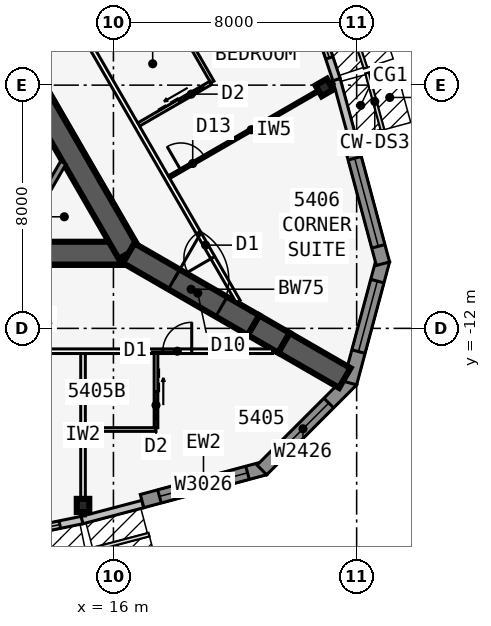
"""IFC4 building model, lengths in metres.
Left out: names, types, materials, properties, quantities, classifications, styles, units other than length and angle.
Written with IfcOpenShell. Run it as: python <this file> out.ifc"""

import sys

from ifc_helpers import new_model, si_unit, direction, frame, frame_2d, origin, origin_2d, place, context, subcontext, project, spatial, polyline, rectangle, i_section, outline, extrude, element, fill, save


model = new_model("IFC4")
c1 = context("Model", 3, precision=1e-05, world=origin(), true_north=direction((0.0, 1.0)))
c2 = subcontext(c1, "Body", "Model", "MODEL_VIEW")
j1 = project(units=[si_unit("LENGTHUNIT", "METRE"), si_unit("PLANEANGLEUNIT", "RADIAN")], contexts=[c1])
p1 = place(None, origin())
s1 = spatial("IfcSite", under=j1, at=p1, CompositionType="ELEMENT")
p2 = place(p1, origin())
s2 = spatial("IfcBuilding", under=s1, at=p2, CompositionType="ELEMENT")
p3 = place(p2, frame((0.0, 0.0, 204.5)))
s3 = spatial("IfcBuildingStorey", under=s2, at=p3, CompositionType="ELEMENT", Elevation=204.5)
p4 = place(p3, frame((-16.5, -9.526, 0.0), z_axis=(0.0, 0.0, 1.0), x_axis=(1.0, 0.0, 0.0)))
e1 = element("IfcWall", 1, at=p4, inside=s3, PredefinedType="SHEAR", context=c2, shape_type="SweptSolid", body=[
    extrude(rectangle(XDim=33.0, YDim=0.75, at=frame_2d((16.5, 0.0))), origin(), (0.0, 0.0, 1.0), 3.6),
])
p5 = place(p4, frame((14.05, 0.0, 0.0)))
e2 = element("IfcOpeningElement", 2, at=p5, cuts=e1, PredefinedType="OPENING", context=c2, shape_type="SweptSolid", body=[
    extrude(rectangle(XDim=1.8, YDim=2.13, at=frame_2d((0.9, 1.065))), frame((0.0, 0.385, 0.0), z_axis=(0.0, -1.0, 0.0), x_axis=(1.0, 0.0, 0.0)), (0.0, 0.0, 1.0), 0.77),
])
p6 = place(p3, frame((16.5, -9.526, 0.0), z_axis=(0.0, 0.0, 1.0), x_axis=(-0.499999749417, 0.866025548458, 0.0)))
e3 = element("IfcWall", 3, at=p6, inside=s3, PredefinedType="SHEAR", context=c2, shape_type="SweptSolid", body=[
    extrude(rectangle(XDim=33.0, YDim=0.75, at=frame_2d((16.5, 0.0))), origin(), (0.0, 0.0, 1.0), 3.6),
])
p7 = place(p6, frame((14.15, 0.0, 0.0)))
e4 = element("IfcOpeningElement", 4, at=p7, cuts=e3, PredefinedType="OPENING", context=c2, shape_type="SweptSolid", body=[
    extrude(rectangle(XDim=1.8, YDim=2.13, at=frame_2d((0.9, 1.065))), frame((0.0, 0.385, 0.0), z_axis=(0.0, -1.0, 0.0), x_axis=(1.0, 0.0, 0.0)), (0.0, 0.0, 1.0), 0.77),
])
p8 = place(p6, frame((12.6, 0.0, 0.0)))
e5 = element("IfcOpeningElement", 5, at=p8, cuts=e3, PredefinedType="OPENING", context=c2, shape_type="SweptSolid", body=[
    extrude(rectangle(XDim=1.0, YDim=2.13, at=frame_2d((0.5, 1.065))), frame((0.0, 0.385, 0.0), z_axis=(0.0, -1.0, 0.0), x_axis=(1.0, 0.0, 0.0)), (0.0, 0.0, 1.0), 0.77),
])
p9 = place(p3, frame((16.5, -9.526, 0.0), z_axis=(0.0, 0.0, 1.0), x_axis=(0.866031398331, -0.499989616998, 0.0)))
e6 = element("IfcWall", 6, at=p9, inside=s3, PredefinedType="SHEAR", context=c2, shape_type="SweptSolid", body=[
    extrude(rectangle(XDim=4.746, YDim=0.75, at=frame_2d((2.373, 0.0))), origin(), (0.0, 0.0, 1.0), 3.6),
])
p10 = place(p9, frame((1.725, 0.0, 0.0)))
e7 = element("IfcOpeningElement", 7, at=p10, cuts=e6, PredefinedType="OPENING", context=c2, shape_type="SweptSolid", body=[
    extrude(rectangle(XDim=1.8, YDim=2.13, at=frame_2d((0.9, 1.065))), frame((0.0, 0.385, 0.0), z_axis=(0.0, -1.0, 0.0), x_axis=(1.0, 0.0, 0.0)), (0.0, 0.0, 1.0), 0.77),
])
p11 = place(p3, frame((20.61, -11.899, 0.0), z_axis=(0.0, 0.0, 1.0), x_axis=(0.866009537788, -0.500027479704, 0.0)))
e8 = element("IfcWall", 8, at=p11, inside=s3, PredefinedType="SHEAR", context=c2, shape_type="SweptSolid", body=[
    extrude(rectangle(XDim=1.155, YDim=0.75, at=frame_2d((0.577, 0.0))), origin(), (0.0, 0.0, 1.0), 3.6),
])
p12 = place(p3, frame((21.61, -12.477, 0.0), z_axis=(0.0, 0.0, 1.0), x_axis=(0.866055313784, -0.499948190782, 0.0)))
e9 = element("IfcWall", 9, at=p12, inside=s3, PredefinedType="SHEAR", context=c2, shape_type="SweptSolid", body=[
    extrude(rectangle(XDim=2.309, YDim=0.75, at=frame_2d((1.155, 0.0))), origin(), (0.0, 0.0, 1.0), 3.6),
])
for number, where, z_axis, x_axis in (
    (10, (15.0, -17.825, 0.0), (0.0, 0.0, 1.0), (1.0, 0.0, 0.0)),
    (11, (22.937, -4.078, 0.0), (0.0, 0.0, 1.0), (-0.5, 0.866, 0.0)),
):
    element("IfcColumn", number, at=place(p3, frame(where, z_axis=z_axis, x_axis=x_axis)), inside=s3, PredefinedType="COLUMN", context=c2, shape_type="SweptSolid", body=[
        extrude(i_section(OverallWidth=0.411, OverallDepth=0.434, WebThickness=0.036, FlangeThickness=0.057, at=origin_2d()), origin(), (0.0, 0.0, 1.0), 3.6),
    ])
p13 = place(p3, frame((9.975, -19.332, 0.0), z_axis=(0.0, 0.0, 1.0), x_axis=(0.979461488189, 0.201631329795, 0.0)))
e12 = element("IfcWall", 12, at=p13, inside=s3, PredefinedType="STANDARD", context=c2, shape_type="SweptSolid", body=[
    extrude(rectangle(XDim=5.105, YDim=0.25, at=frame_2d((2.552, 0.0))), origin(), (0.0, 0.0, 1.0), 3.435),
])
p14 = place(p13, frame((0.752, 0.0, 0.45)))
e13 = element("IfcOpeningElement", 13, at=p14, cuts=e12, PredefinedType="OPENING", context=c2, shape_type="SweptSolid", body=[
    extrude(rectangle(XDim=3.6, YDim=2.6, at=frame_2d((1.8, 1.3))), frame((0.0, 0.135, 0.0), z_axis=(0.0, -1.0, 0.0), x_axis=(1.0, 0.0, 0.0)), (0.0, 0.0, 1.0), 0.27),
])
p15 = place(p3, frame((14.968, -18.304, 0.0), z_axis=(0.0, 0.0, 1.0), x_axis=(0.967010286052, 0.254737328772, 0.0)))
e14 = element("IfcWall", 14, at=p15, inside=s3, PredefinedType="STANDARD", context=c2, shape_type="SweptSolid", body=[
    extrude(rectangle(XDim=2.068, YDim=0.25, at=frame_2d((1.034, 0.0))), origin(), (0.0, 0.0, 1.0), 3.435),
])
p16 = place(p3, frame((16.942, -17.681, 0.0), z_axis=(0.0, 0.0, 1.0), x_axis=(0.965920442324, 0.258839137498, 0.0)))
e15 = element("IfcWall", 15, at=p16, inside=s3, PredefinedType="SOLIDWALL", context=c2, shape_type="SweptSolid", body=[
    extrude(rectangle(XDim=4.184, YDim=0.45, at=frame_2d((2.092, 0.0))), origin(), (0.0, 0.0, 1.0), 3.435),
])
p17 = place(p16, frame((0.592, 0.0, 0.45)))
e16 = element("IfcOpeningElement", 16, at=p17, cuts=e15, PredefinedType="OPENING", context=c2, shape_type="SweptSolid", body=[
    extrude(rectangle(XDim=3.0, YDim=2.6, at=frame_2d((1.5, 1.3))), frame((0.0, 0.235, 0.0), z_axis=(0.0, -1.0, 0.0), x_axis=(1.0, 0.0, 0.0)), (0.0, 0.0, 1.0), 0.47),
])
p18 = place(p3, frame((20.882, -16.656, 0.0), z_axis=(0.0, 0.0, 1.0), x_axis=(0.707077605902, 0.707135955267, 0.0)))
e17 = element("IfcWall", 17, at=p18, inside=s3, PredefinedType="SOLIDWALL", context=c2, shape_type="SweptSolid", body=[
    extrude(outline(polyline([(4.184, 0.225), (4.125, 0.225), (3.705, 0.113), (3.675, 0.225), (0.0, 0.225), (0.0, -0.225), (4.184, -0.225), (4.184, 0.225)])), origin(), (0.0, 0.0, 1.0), 3.435),
])
p19 = place(p18, frame((0.713, 0.0, 0.45)))
e18 = element("IfcOpeningElement", 18, at=p19, cuts=e17, PredefinedType="OPENING", context=c2, shape_type="SweptSolid", body=[
    extrude(rectangle(XDim=2.4, YDim=2.6, at=frame_2d((1.2, 1.3))), frame((0.0, 0.235, 0.0), z_axis=(0.0, -1.0, 0.0), x_axis=(1.0, 0.0, 0.0)), (0.0, 0.0, 1.0), 0.47),
])
p20 = place(p3, frame((23.783, -13.798, 0.0), z_axis=(0.0, 0.0, 1.0), x_axis=(0.258799282522, 0.96593112144, 0.0)))
e19 = element("IfcWall", 19, at=p20, inside=s3, PredefinedType="SOLIDWALL", context=c2, shape_type="SweptSolid", body=[
    extrude(outline(polyline([(4.184, 0.225), (0.509, 0.225), (0.479, 0.113), (0.059, 0.225), (0.0, 0.225), (0.0, -0.225), (4.184, -0.225), (4.184, 0.225)])), origin(), (0.0, 0.0, 1.0), 3.435),
])
p21 = place(p20, frame((1.071, 0.0, 0.45)))
e20 = element("IfcOpeningElement", 20, at=p21, cuts=e19, PredefinedType="OPENING", context=c2, shape_type="SweptSolid", body=[
    extrude(rectangle(XDim=2.4, YDim=2.6, at=frame_2d((1.2, 1.3))), frame((0.0, 0.235, 0.0), z_axis=(0.0, -1.0, 0.0), x_axis=(1.0, 0.0, 0.0)), (0.0, 0.0, 1.0), 0.47),
])
p22 = place(p3, frame((24.865, -9.873, 0.0), z_axis=(0.0, 0.0, 1.0), x_axis=(-0.258784695888, 0.965935029479, 0.0)))
e21 = element("IfcWall", 21, at=p22, inside=s3, PredefinedType="SOLIDWALL", context=c2, shape_type="SweptSolid", body=[
    extrude(rectangle(XDim=4.184, YDim=0.45, at=frame_2d((2.092, 0.0))), origin(), (0.0, 0.0, 1.0), 3.435),
])
p23 = place(p22, frame((0.592, 0.0, 0.45)))
e22 = element("IfcOpeningElement", 22, at=p23, cuts=e21, PredefinedType="OPENING", context=c2, shape_type="SweptSolid", body=[
    extrude(rectangle(XDim=3.0, YDim=2.6, at=frame_2d((1.5, 1.3))), frame((0.0, 0.235, 0.0), z_axis=(0.0, -1.0, 0.0), x_axis=(1.0, 0.0, 0.0)), (0.0, 0.0, 1.0), 0.47),
])
p24 = place(p3, frame((23.879, -5.806, 0.0), z_axis=(0.0, 0.0, 1.0), x_axis=(-0.262867703986, 0.964831887015, 0.0)))
e23 = element("IfcWall", 23, at=p24, inside=s3, PredefinedType="STANDARD", context=c2, shape_type="SweptSolid", body=[
    extrude(rectangle(XDim=2.068, YDim=0.25, at=frame_2d((1.034, 0.0))), origin(), (0.0, 0.0, 1.0), 3.435),
])
p25 = place(p3, frame((23.338, -3.817, 0.0), z_axis=(0.0, 0.0, 1.0), x_axis=(-0.315108478109, 0.949055660656, 0.0)))
e24 = element("IfcWall", 24, at=p25, inside=s3, PredefinedType="STANDARD", context=c2, shape_type="SweptSolid", body=[
    extrude(rectangle(XDim=5.105, YDim=0.25, at=frame_2d((2.552, 0.0))), origin(), (0.0, 0.0, 1.0), 3.435),
])
p26 = place(p25, frame((0.752, 0.0, 0.45)))
e25 = element("IfcOpeningElement", 25, at=p26, cuts=e24, PredefinedType="OPENING", context=c2, shape_type="SweptSolid", body=[
    extrude(rectangle(XDim=3.6, YDim=2.6, at=frame_2d((1.8, 1.3))), frame((0.0, 0.135, 0.0), z_axis=(0.0, -1.0, 0.0), x_axis=(1.0, 0.0, 0.0)), (0.0, 0.0, 1.0), 0.27),
])
p27 = place(p3, frame((-21.236, -12.751, 0.0), z_axis=(0.0, 0.0, 1.0), x_axis=(1.0, 0.0, 0.0)))
e26 = element("IfcWall", 26, at=p27, inside=s3, PredefinedType="PARTITIONING", context=c2, shape_type="SweptSolid", body=[
    extrude(rectangle(XDim=42.472, YDim=0.15, at=frame_2d((21.236, 0.0))), origin(), (0.0, 0.0, 1.0), 3.435),
])
p28 = place(p27, frame((2.661, 0.0, 0.0)))
e27 = element("IfcOpeningElement", 27, at=p28, cuts=e26, PredefinedType="OPENING", context=c2, shape_type="SweptSolid", body=[
    extrude(rectangle(XDim=0.95, YDim=2.13, at=frame_2d((0.475, 1.065))), frame((0.0, 0.085, 0.0), z_axis=(0.0, -1.0, 0.0), x_axis=(1.0, 0.0, 0.0)), (0.0, 0.0, 1.0), 0.17),
])
p29 = place(p27, frame((8.261, 0.0, 0.0)))
e28 = element("IfcOpeningElement", 28, at=p29, cuts=e26, PredefinedType="OPENING", context=c2, shape_type="SweptSolid", body=[
    extrude(rectangle(XDim=0.95, YDim=2.13, at=frame_2d((0.475, 1.065))), frame((0.0, 0.085, 0.0), z_axis=(0.0, -1.0, 0.0), x_axis=(1.0, 0.0, 0.0)), (0.0, 0.0, 1.0), 0.17),
])
p30 = place(p27, frame((18.861, 0.0, 0.0)))
e29 = element("IfcOpeningElement", 29, at=p30, cuts=e26, PredefinedType="OPENING", context=c2, shape_type="SweptSolid", body=[
    extrude(rectangle(XDim=0.95, YDim=2.13, at=frame_2d((0.475, 1.065))), frame((0.0, 0.085, 0.0), z_axis=(0.0, -1.0, 0.0), x_axis=(1.0, 0.0, 0.0)), (0.0, 0.0, 1.0), 0.17),
])
p31 = place(p27, frame((23.236, 0.0, 0.0)))
e30 = element("IfcOpeningElement", 30, at=p31, cuts=e26, PredefinedType="OPENING", context=c2, shape_type="SweptSolid", body=[
    extrude(rectangle(XDim=1.0, YDim=2.13, at=frame_2d((0.5, 1.065))), frame((0.0, 0.085, 0.0), z_axis=(0.0, -1.0, 0.0), x_axis=(1.0, 0.0, 0.0)), (0.0, 0.0, 1.0), 0.17),
])
p32 = place(p27, frame((29.461, 0.0, 0.0)))
e31 = element("IfcOpeningElement", 31, at=p32, cuts=e26, PredefinedType="OPENING", context=c2, shape_type="SweptSolid", body=[
    extrude(rectangle(XDim=0.95, YDim=2.13, at=frame_2d((0.475, 1.065))), frame((0.0, 0.085, 0.0), z_axis=(0.0, -1.0, 0.0), x_axis=(1.0, 0.0, 0.0)), (0.0, 0.0, 1.0), 0.17),
])
p33 = place(p27, frame((38.861, 0.0, 0.0)))
e32 = element("IfcOpeningElement", 32, at=p33, cuts=e26, PredefinedType="OPENING", context=c2, shape_type="SweptSolid", body=[
    extrude(rectangle(XDim=0.95, YDim=2.13, at=frame_2d((0.475, 1.065))), frame((0.0, 0.085, 0.0), z_axis=(0.0, -1.0, 0.0), x_axis=(1.0, 0.0, 0.0)), (0.0, 0.0, 1.0), 0.17),
])
p34 = place(p3, frame((15.0, -12.826, 0.0), z_axis=(0.0, 0.0, 1.0), x_axis=(0.0, -1.0, 0.0)))
e33 = element("IfcWall", 33, at=p34, inside=s3, PredefinedType="PARTITIONING", context=c2, shape_type="SweptSolid", body=[
    extrude(rectangle(XDim=5.34, YDim=0.15, at=frame_2d((2.67, 0.0))), origin(), (0.0, 0.0, 1.0), 2.589),
])
p35 = place(p3, frame((15.0, -15.326, 0.0), z_axis=(0.0, 0.0, 1.0), x_axis=(1.0, 0.0, 0.0)))
e34 = element("IfcWall", 34, at=p35, inside=s3, PredefinedType="PLUMBINGWALL", context=c2, shape_type="SweptSolid", body=[
    extrude(rectangle(XDim=2.4, YDim=0.12, at=frame_2d((1.2, 0.0))), origin(), (0.0, 0.0, 1.0), 3.435),
])
p36 = place(p3, frame((17.4, -12.826, 0.0), z_axis=(0.0, 0.0, 1.0), x_axis=(0.0, -1.0, 0.0)))
e35 = element("IfcWall", 35, at=p36, inside=s3, PredefinedType="PLUMBINGWALL", context=c2, shape_type="SweptSolid", body=[
    extrude(rectangle(XDim=2.44, YDim=0.12, at=frame_2d((1.22, 0.0))), origin(), (0.0, 0.0, 1.0), 3.435),
])
p37 = place(p36, frame((1.25, 0.0, 0.0)))
e36 = element("IfcOpeningElement", 36, at=p37, cuts=e35, PredefinedType="OPENING", context=c2, shape_type="SweptSolid", body=[
    extrude(rectangle(XDim=0.9, YDim=2.13, at=frame_2d((0.45, 1.065))), frame((0.0, 0.07, 0.0), z_axis=(0.0, -1.0, 0.0), x_axis=(1.0, 0.0, 0.0)), (0.0, 0.0, 1.0), 0.14),
])
p38 = place(p3, frame((20.102, -11.115, 0.0), z_axis=(0.0, 0.0, 1.0), x_axis=(-0.500000265775, 0.866025250339, 0.0)))
e37 = element("IfcWall", 37, at=p38, inside=s3, PredefinedType="PARTITIONING", context=c2, shape_type="SweptSolid", body=[
    extrude(rectangle(XDim=39.354, YDim=0.15, at=frame_2d((19.677, 0.0))), origin(), (0.0, 0.0, 1.0), 3.435),
])
p39 = place(p38, frame((1.665, 0.0, 0.0)))
e38 = element("IfcOpeningElement", 38, at=p39, cuts=e37, PredefinedType="OPENING", context=c2, shape_type="SweptSolid", body=[
    extrude(rectangle(XDim=0.95, YDim=2.13, at=frame_2d((0.475, 1.065))), frame((0.0, 0.085, 0.0), z_axis=(0.0, -1.0, 0.0), x_axis=(1.0, 0.0, 0.0)), (0.0, 0.0, 1.0), 0.17),
])
p40 = place(p38, frame((12.902, 0.0, 0.0)))
e39 = element("IfcOpeningElement", 39, at=p40, cuts=e37, PredefinedType="OPENING", context=c2, shape_type="SweptSolid", body=[
    extrude(rectangle(XDim=0.95, YDim=2.13, at=frame_2d((0.475, 1.065))), frame((0.0, 0.085, 0.0), z_axis=(0.0, -1.0, 0.0), x_axis=(1.0, 0.0, 0.0)), (0.0, 0.0, 1.0), 0.17),
])
p41 = place(p38, frame((17.302, 0.0, 0.0)))
e40 = element("IfcOpeningElement", 40, at=p41, cuts=e37, PredefinedType="OPENING", context=c2, shape_type="SweptSolid", body=[
    extrude(rectangle(XDim=0.95, YDim=2.13, at=frame_2d((0.475, 1.065))), frame((0.0, 0.085, 0.0), z_axis=(0.0, -1.0, 0.0), x_axis=(1.0, 0.0, 0.0)), (0.0, 0.0, 1.0), 0.17),
])
p42 = place(p38, frame((22.902, 0.0, 0.0)))
e41 = element("IfcOpeningElement", 41, at=p42, cuts=e37, PredefinedType="OPENING", context=c2, shape_type="SweptSolid", body=[
    extrude(rectangle(XDim=0.95, YDim=2.13, at=frame_2d((0.475, 1.065))), frame((0.0, 0.085, 0.0), z_axis=(0.0, -1.0, 0.0), x_axis=(1.0, 0.0, 0.0)), (0.0, 0.0, 1.0), 0.17),
])
p43 = place(p38, frame((32.302, 0.0, 0.0)))
e42 = element("IfcOpeningElement", 42, at=p43, cuts=e37, PredefinedType="OPENING", context=c2, shape_type="SweptSolid", body=[
    extrude(rectangle(XDim=0.95, YDim=2.13, at=frame_2d((0.475, 1.065))), frame((0.0, 0.085, 0.0), z_axis=(0.0, -1.0, 0.0), x_axis=(1.0, 0.0, 0.0)), (0.0, 0.0, 1.0), 0.17),
])
p44 = place(p38, frame((37.302, 0.0, 0.0)))
e43 = element("IfcOpeningElement", 43, at=p44, cuts=e37, PredefinedType="OPENING", context=c2, shape_type="SweptSolid", body=[
    extrude(rectangle(XDim=0.95, YDim=2.13, at=frame_2d((0.475, 1.065))), frame((0.0, 0.085, 0.0), z_axis=(0.0, -1.0, 0.0), x_axis=(1.0, 0.0, 0.0)), (0.0, 0.0, 1.0), 0.17),
])
p45 = place(p3, frame((17.829, -7.027, 0.0), z_axis=(0.0, 0.0, 1.0), x_axis=(0.866026604282, 0.499997920671, 0.0)))
e44 = element("IfcWall", 44, at=p45, inside=s3, PredefinedType="PARTITIONING", context=c2, shape_type="SweptSolid", body=[
    extrude(rectangle(XDim=6.24, YDim=0.1, at=frame_2d((3.12, 0.0))), origin(), (0.0, 0.0, 1.0), 2.589),
])
p46 = place(p45, frame((0.45, 0.0, 0.0)))
e45 = element("IfcOpeningElement", 45, at=p46, cuts=e44, PredefinedType="OPENING", context=c2, shape_type="SweptSolid", body=[
    extrude(rectangle(XDim=0.9, YDim=2.13, at=frame_2d((0.45, 1.065))), frame((0.0, 0.06, 0.0), z_axis=(0.0, -1.0, 0.0), x_axis=(1.0, 0.0, 0.0)), (0.0, 0.0, 1.0), 0.12),
])
p47 = place(p3, frame((19.253, -3.895, 0.0), z_axis=(0.0, 0.0, 1.0), x_axis=(-0.499990139034, 0.866031096941, 0.0)))
e46 = element("IfcWall", 46, at=p47, inside=s3, PredefinedType="PLUMBINGWALL", context=c2, shape_type="SweptSolid", body=[
    extrude(rectangle(XDim=3.0, YDim=0.12, at=frame_2d((1.5, 0.0))), origin(), (0.0, 0.0, 1.0), 3.435),
])
p48 = place(p3, frame((16.829, -5.295, 0.0), z_axis=(0.0, 0.0, 1.0), x_axis=(0.866035715982, 0.499982138324, 0.0)))
e47 = element("IfcWall", 47, at=p48, inside=s3, PredefinedType="PLUMBINGWALL", context=c2, shape_type="SweptSolid", body=[
    extrude(rectangle(XDim=2.74, YDim=0.12, at=frame_2d((1.37, 0.0))), origin(), (0.0, 0.0, 1.0), 3.435),
])
p49 = place(p48, frame((1.55, 0.0, 0.0)))
e48 = element("IfcOpeningElement", 48, at=p49, cuts=e47, PredefinedType="OPENING", context=c2, shape_type="SweptSolid", body=[
    extrude(rectangle(XDim=0.9, YDim=2.13, at=frame_2d((0.45, 1.065))), frame((0.0, 0.07, 0.0), z_axis=(0.0, -1.0, 0.0), x_axis=(1.0, 0.0, 0.0)), (0.0, 0.0, 1.0), 0.14),
])
p50 = place(p3, frame((14.349, -6.551, 0.0), z_axis=(0.0, 0.0, 1.0), x_axis=(-0.499952404951, -0.866052881055, 0.0)))
e49 = element("IfcWall", 49, at=p50, inside=s3, PredefinedType="SOLIDWALL", context=c2, shape_type="SweptSolid", body=[
    extrude(rectangle(XDim=3.002, YDim=0.2, at=frame_2d((1.501, 0.0))), origin(), (0.0, 0.0, 1.0), 3.435),
])
p51 = place(p14, origin())
e50 = element("IfcWindow", 50, at=p51, inside=s3, PartitioningType="SINGLE_PANEL", PredefinedType="WINDOW", context=c2, shape_type="SweptSolid", body=[
    extrude(rectangle(XDim=3.6, YDim=2.6, at=frame_2d((1.8, 1.3))), frame((0.0, 0.03, 0.0), z_axis=(0.0, -1.0, 0.0), x_axis=(1.0, 0.0, 0.0)), (0.0, 0.0, 1.0), 0.06),
])
fill(e13, e50)
p52 = place(p17, origin())
e51 = element("IfcWindow", 51, at=p52, inside=s3, PartitioningType="SINGLE_PANEL", PredefinedType="WINDOW", context=c2, shape_type="SweptSolid", body=[
    extrude(rectangle(XDim=3.0, YDim=2.6, at=frame_2d((1.5, 1.3))), frame((0.0, 0.03, 0.0), z_axis=(0.0, -1.0, 0.0), x_axis=(1.0, 0.0, 0.0)), (0.0, 0.0, 1.0), 0.06),
])
fill(e16, e51)
p53 = place(p19, origin())
e52 = element("IfcWindow", 52, at=p53, inside=s3, PartitioningType="SINGLE_PANEL", PredefinedType="WINDOW", context=c2, shape_type="SweptSolid", body=[
    extrude(rectangle(XDim=2.4, YDim=2.6, at=frame_2d((1.2, 1.3))), frame((0.0, 0.03, 0.0), z_axis=(0.0, -1.0, 0.0), x_axis=(1.0, 0.0, 0.0)), (0.0, 0.0, 1.0), 0.06),
])
fill(e18, e52)
p54 = place(p21, origin())
e53 = element("IfcWindow", 53, at=p54, inside=s3, PartitioningType="SINGLE_PANEL", PredefinedType="WINDOW", context=c2, shape_type="SweptSolid", body=[
    extrude(rectangle(XDim=2.4, YDim=2.6, at=frame_2d((1.2, 1.3))), frame((0.0, 0.03, 0.0), z_axis=(0.0, -1.0, 0.0), x_axis=(1.0, 0.0, 0.0)), (0.0, 0.0, 1.0), 0.06),
])
fill(e20, e53)
p55 = place(p23, origin())
e54 = element("IfcWindow", 54, at=p55, inside=s3, PartitioningType="SINGLE_PANEL", PredefinedType="WINDOW", context=c2, shape_type="SweptSolid", body=[
    extrude(rectangle(XDim=3.0, YDim=2.6, at=frame_2d((1.5, 1.3))), frame((0.0, 0.03, 0.0), z_axis=(0.0, -1.0, 0.0), x_axis=(1.0, 0.0, 0.0)), (0.0, 0.0, 1.0), 0.06),
])
fill(e22, e54)
p56 = place(p26, origin())
e55 = element("IfcWindow", 55, at=p56, inside=s3, PartitioningType="SINGLE_PANEL", PredefinedType="WINDOW", context=c2, shape_type="SweptSolid", body=[
    extrude(rectangle(XDim=3.6, YDim=2.6, at=frame_2d((1.8, 1.3))), frame((0.0, 0.03, 0.0), z_axis=(0.0, -1.0, 0.0), x_axis=(1.0, 0.0, 0.0)), (0.0, 0.0, 1.0), 0.06),
])
fill(e25, e55)
p57 = place(p37, origin())
e56 = element("IfcDoor", 56, at=p57, inside=s3, OperationType="SLIDING_TO_LEFT", PredefinedType="DOOR", context=c2, shape_type="SweptSolid", body=[
    extrude(rectangle(XDim=0.9, YDim=2.13, at=frame_2d((0.45, 1.065))), frame((0.0, 0.025, 0.0), z_axis=(0.0, -1.0, 0.0), x_axis=(1.0, 0.0, 0.0)), (0.0, 0.0, 1.0), 0.05),
])
fill(e36, e56)
p58 = place(p33, origin())
e57 = element("IfcDoor", 57, at=p58, inside=s3, OperationType="SINGLE_SWING_RIGHT", PredefinedType="DOOR", context=c2, shape_type="SweptSolid", body=[
    extrude(rectangle(XDim=0.95, YDim=2.13, at=frame_2d((0.475, 1.065))), frame((0.0, 0.025, 0.0), z_axis=(0.0, -1.0, 0.0), x_axis=(1.0, 0.0, 0.0)), (0.0, 0.0, 1.0), 0.05),
])
fill(e32, e57)
p59 = place(p46, origin())
e58 = element("IfcDoor", 58, at=p59, inside=s3, OperationType="SINGLE_SWING_LEFT", PredefinedType="DOOR", context=c2, shape_type="SweptSolid", body=[
    extrude(rectangle(XDim=0.9, YDim=2.13, at=frame_2d((0.45, 1.065))), frame((0.0, 0.025, 0.0), z_axis=(0.0, -1.0, 0.0), x_axis=(1.0, 0.0, 0.0)), (0.0, 0.0, 1.0), 0.05),
])
fill(e45, e58)
p60 = place(p39, origin())
e59 = element("IfcDoor", 59, at=p60, inside=s3, OperationType="SINGLE_SWING_LEFT", PredefinedType="DOOR", context=c2, shape_type="SweptSolid", body=[
    extrude(rectangle(XDim=0.95, YDim=2.13, at=frame_2d((0.475, 1.065))), frame((0.0, 0.025, 0.0), z_axis=(0.0, -1.0, 0.0), x_axis=(1.0, 0.0, 0.0)), (0.0, 0.0, 1.0), 0.05),
])
fill(e38, e59)
p61 = place(p49, origin())
e60 = element("IfcDoor", 60, at=p61, inside=s3, OperationType="SLIDING_TO_LEFT", PredefinedType="DOOR", context=c2, shape_type="SweptSolid", body=[
    extrude(rectangle(XDim=0.9, YDim=2.13, at=frame_2d((0.45, 1.065))), frame((0.0, 0.025, 0.0), z_axis=(0.0, -1.0, 0.0), x_axis=(1.0, 0.0, 0.0)), (0.0, 0.0, 1.0), 0.05),
])
fill(e48, e60)
p62 = place(p10, origin())
e61 = element("IfcDoor", 61, at=p62, inside=s3, OperationType="DOUBLE_DOOR_DOUBLE_SWING", PredefinedType="DOOR", context=c2, shape_type="SweptSolid", body=[
    extrude(rectangle(XDim=1.8, YDim=2.13, at=frame_2d((0.9, 1.065))), frame((0.0, 0.025, 0.0), z_axis=(0.0, -1.0, 0.0), x_axis=(1.0, 0.0, 0.0)), (0.0, 0.0, 1.0), 0.05),
])
fill(e7, e61)
save(model, sys.argv[1])
